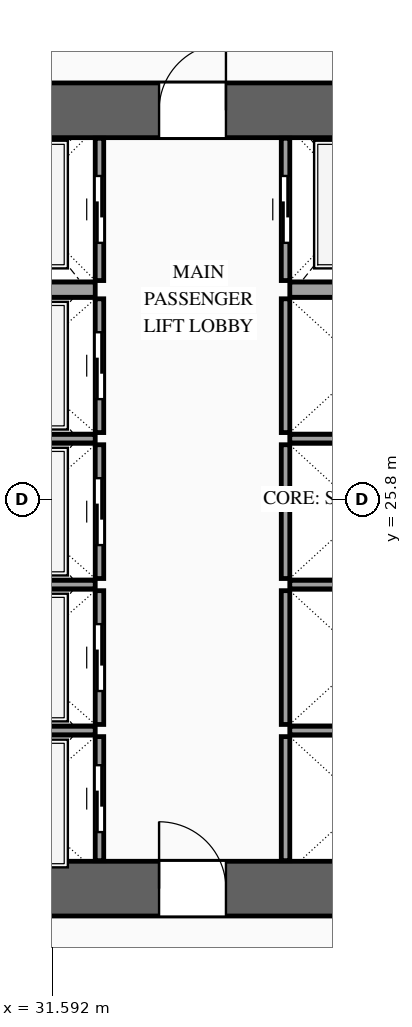
"""IFC4 building model, lengths in metres.
Left out: names, types, materials, properties, quantities, classifications, styles, units other than length and angle.
Written with IfcOpenShell. Run it as: python <this file> out.ifc"""

import sys

from ifc_helpers import new_model, si_unit, direction, frame, frame_2d, origin, place, context, subcontext, project, spatial, rectangle, extrude, source, transform, mapped, element, fill, save


model = new_model("IFC4")
c1 = context("Model", 3, precision=1e-05, world=origin(), true_north=direction((0.0, 1.0)))
c2 = subcontext(c1, "Body", "Model", "MODEL_VIEW")
j1 = project(units=[si_unit("LENGTHUNIT", "METRE"), si_unit("PLANEANGLEUNIT", "RADIAN")], contexts=[c1])
p1 = place(None, origin())
s1 = spatial("IfcSite", under=j1, at=p1, CompositionType="ELEMENT")
p2 = place(p1, origin())
s2 = spatial("IfcBuilding", under=s1, at=p2, CompositionType="ELEMENT")
p3 = place(p2, frame((0.0, 0.0, 25.8)))
s3 = spatial("IfcBuildingStorey", under=s2, at=p3, CompositionType="ELEMENT", Elevation=25.8)
p4 = place(p3, frame((23.35, 19.4, 0.0), z_axis=(0.0, 0.0, 1.0), x_axis=(1.0, 0.0, 0.0)))
e1 = element("IfcWall", 1, at=p4, inside=s3, PredefinedType="SHEAR", context=c2, shape_type="SweptSolid", body=[
    extrude(rectangle(XDim=27.3, YDim=0.9, at=frame_2d((13.65, 0.0))), origin(), (0.0, 0.0, 1.0), 4.8),
])
p5 = place(p4, frame((2.1, 0.0, 0.0)))
e2 = element("IfcOpeningElement", 2, at=p5, cuts=e1, PredefinedType="OPENING", context=c2, shape_type="SweptSolid", body=[
    extrude(rectangle(XDim=1.1, YDim=2.2, at=frame_2d((0.55, 1.1))), frame((0.0, 0.465, 0.0), z_axis=(0.0, -1.0, 0.0), x_axis=(1.0, 0.0, 0.0)), (0.0, 0.0, 1.0), 0.93),
])
p6 = place(p4, frame((10.0, 0.0, 0.0)))
e3 = element("IfcOpeningElement", 3, at=p6, cuts=e1, PredefinedType="OPENING", context=c2, shape_type="SweptSolid", body=[
    extrude(rectangle(XDim=1.1, YDim=2.2, at=frame_2d((0.55, 1.1))), frame((0.0, 0.465, 0.0), z_axis=(0.0, -1.0, 0.0), x_axis=(1.0, 0.0, 0.0)), (0.0, 0.0, 1.0), 0.93),
])
p7 = place(p4, frame((23.2, 0.0, 0.0)))
e4 = element("IfcOpeningElement", 4, at=p7, cuts=e1, PredefinedType="OPENING", context=c2, shape_type="SweptSolid", body=[
    extrude(rectangle(XDim=1.1, YDim=2.2, at=frame_2d((0.55, 1.1))), frame((0.0, 0.465, 0.0), z_axis=(0.0, -1.0, 0.0), x_axis=(1.0, 0.0, 0.0)), (0.0, 0.0, 1.0), 0.93),
])
p8 = place(p4, frame((19.82, 0.0, 0.0)))
e5 = element("IfcOpeningElement", 5, at=p8, cuts=e1, PredefinedType="OPENING", context=c2, shape_type="SweptSolid", body=[
    extrude(rectangle(XDim=0.9, YDim=2.15, at=frame_2d((0.45, 1.075))), frame((0.0, 0.465, 0.0), z_axis=(0.0, -1.0, 0.0), x_axis=(1.0, 0.0, 0.0)), (0.0, 0.0, 1.0), 0.93),
])
p9 = place(p4, frame((18.38, 0.0, 0.0)))
e6 = element("IfcOpeningElement", 6, at=p9, cuts=e1, PredefinedType="OPENING", context=c2, shape_type="SweptSolid", body=[
    extrude(rectangle(XDim=0.9, YDim=2.15, at=frame_2d((0.45, 1.075))), frame((0.0, 0.465, 0.0), z_axis=(0.0, -1.0, 0.0), x_axis=(1.0, 0.0, 0.0)), (0.0, 0.0, 1.0), 0.93),
])
p10 = place(p3, frame((23.35, 32.2, 0.0), z_axis=(0.0, 0.0, 1.0), x_axis=(1.0, 0.0, 0.0)))
e7 = element("IfcWall", 7, at=p10, inside=s3, PredefinedType="SHEAR", context=c2, shape_type="SweptSolid", body=[
    extrude(rectangle(XDim=27.3, YDim=0.9, at=frame_2d((13.65, 0.0))), origin(), (0.0, 0.0, 1.0), 4.8),
])
p11 = place(p10, frame((4.72, 0.0, 0.0)))
e8 = element("IfcOpeningElement", 8, at=p11, cuts=e7, PredefinedType="OPENING", context=c2, shape_type="SweptSolid", body=[
    extrude(rectangle(XDim=0.9, YDim=2.15, at=frame_2d((0.45, 1.075))), frame((0.0, 0.465, 0.0), z_axis=(0.0, -1.0, 0.0), x_axis=(1.0, 0.0, 0.0)), (0.0, 0.0, 1.0), 0.93),
])
p12 = place(p10, frame((10.0, 0.0, 0.0)))
e9 = element("IfcOpeningElement", 9, at=p12, cuts=e7, PredefinedType="OPENING", context=c2, shape_type="SweptSolid", body=[
    extrude(rectangle(XDim=1.1, YDim=2.2, at=frame_2d((0.55, 1.1))), frame((0.0, 0.465, 0.0), z_axis=(0.0, -1.0, 0.0), x_axis=(1.0, 0.0, 0.0)), (0.0, 0.0, 1.0), 0.93),
])
p13 = place(p10, frame((15.85, 0.0, 0.0)))
e10 = element("IfcOpeningElement", 10, at=p13, cuts=e7, PredefinedType="OPENING", context=c2, shape_type="SweptSolid", body=[
    extrude(rectangle(XDim=1.1, YDim=2.2, at=frame_2d((0.55, 1.1))), frame((0.0, 0.465, 0.0), z_axis=(0.0, -1.0, 0.0), x_axis=(1.0, 0.0, 0.0)), (0.0, 0.0, 1.0), 0.93),
])
p14 = place(p10, frame((18.38, 0.0, 0.0)))
e11 = element("IfcOpeningElement", 11, at=p14, cuts=e7, PredefinedType="OPENING", context=c2, shape_type="SweptSolid", body=[
    extrude(rectangle(XDim=0.9, YDim=2.15, at=frame_2d((0.45, 1.075))), frame((0.0, 0.465, 0.0), z_axis=(0.0, -1.0, 0.0), x_axis=(1.0, 0.0, 0.0)), (0.0, 0.0, 1.0), 0.93),
])
p15 = place(p10, frame((19.82, 0.0, 0.0)))
e12 = element("IfcOpeningElement", 12, at=p15, cuts=e7, PredefinedType="OPENING", context=c2, shape_type="SweptSolid", body=[
    extrude(rectangle(XDim=0.9, YDim=2.15, at=frame_2d((0.45, 1.075))), frame((0.0, 0.465, 0.0), z_axis=(0.0, -1.0, 0.0), x_axis=(1.0, 0.0, 0.0)), (0.0, 0.0, 1.0), 0.93),
])
p16 = place(p3, frame((32.37, 19.86, 0.0), z_axis=(0.0, 0.0, 1.0), x_axis=(0.0, 1.0, 0.0)))
e13 = element("IfcWall", 13, at=p16, inside=s3, PredefinedType="SOLIDWALL", context=c2, shape_type="SweptSolid", body=[
    extrude(rectangle(XDim=2.04, YDim=0.14, at=frame_2d((1.02, 0.0))), origin(), (0.0, 0.0, 1.0), 4.5),
])
p17 = place(p16, frame((0.47, 0.0, 0.0)))
e14 = element("IfcOpeningElement", 14, at=p17, cuts=e13, PredefinedType="OPENING", context=c2, shape_type="SweptSolid", body=[
    extrude(rectangle(XDim=1.1, YDim=2.2, at=frame_2d((0.55, 1.1))), frame((0.0, 0.085, 0.0), z_axis=(0.0, -1.0, 0.0), x_axis=(1.0, 0.0, 0.0)), (0.0, 0.0, 1.0), 0.17),
])
m1 = source(origin(), c2, "Body", "SweptSolid", [
    extrude(rectangle(XDim=2.5, YDim=0.14, at=frame_2d((1.25, 0.0))), origin(), (0.0, 0.0, 1.0), 4.5),
])
p18 = place(p3, frame((29.8, 22.0, 0.0), z_axis=(0.0, 0.0, 1.0), x_axis=(1.0, 0.0, 0.0)))
e15 = element("IfcWall", 15, at=p18, inside=s3, PredefinedType="SOLIDWALL", context=c2, shape_type="MappedRepresentation", body=[
    mapped(m1, transform((0.0, 0.0, 0.0), scale=1.0)),
])
p19 = place(p3, frame((32.37, 22.1, 0.0), z_axis=(0.0, 0.0, 1.0), x_axis=(0.0, 1.0, 0.0)))
e16 = element("IfcWall", 16, at=p19, inside=s3, PredefinedType="SOLIDWALL", context=c2, shape_type="SweptSolid", body=[
    extrude(rectangle(XDim=2.2, YDim=0.14, at=frame_2d((1.1, 0.0))), origin(), (0.0, 0.0, 1.0), 4.5),
])
p20 = place(p19, frame((0.55, 0.0, 0.0)))
e17 = element("IfcOpeningElement", 17, at=p20, cuts=e16, PredefinedType="OPENING", context=c2, shape_type="SweptSolid", body=[
    extrude(rectangle(XDim=1.1, YDim=2.2, at=frame_2d((0.55, 1.1))), frame((0.0, 0.085, 0.0), z_axis=(0.0, -1.0, 0.0), x_axis=(1.0, 0.0, 0.0)), (0.0, 0.0, 1.0), 0.17),
])
p21 = place(p3, frame((29.8, 24.4, 0.0), z_axis=(0.0, 0.0, 1.0), x_axis=(1.0, 0.0, 0.0)))
e18 = element("IfcWall", 18, at=p21, inside=s3, PredefinedType="SOLIDWALL", context=c2, shape_type="MappedRepresentation", body=[
    mapped(m1, transform((0.0, 0.0, 0.0), scale=1.0)),
])
p22 = place(p3, frame((32.37, 24.5, 0.0), z_axis=(0.0, 0.0, 1.0), x_axis=(0.0, 1.0, 0.0)))
e19 = element("IfcWall", 19, at=p22, inside=s3, PredefinedType="SOLIDWALL", context=c2, shape_type="SweptSolid", body=[
    extrude(rectangle(XDim=2.2, YDim=0.14, at=frame_2d((1.1, 0.0))), origin(), (0.0, 0.0, 1.0), 4.5),
])
p23 = place(p22, frame((0.55, 0.0, 0.0)))
e20 = element("IfcOpeningElement", 20, at=p23, cuts=e19, PredefinedType="OPENING", context=c2, shape_type="SweptSolid", body=[
    extrude(rectangle(XDim=1.1, YDim=2.2, at=frame_2d((0.55, 1.1))), frame((0.0, 0.085, 0.0), z_axis=(0.0, -1.0, 0.0), x_axis=(1.0, 0.0, 0.0)), (0.0, 0.0, 1.0), 0.17),
])
p24 = place(p3, frame((29.8, 26.8, 0.0), z_axis=(0.0, 0.0, 1.0), x_axis=(1.0, 0.0, 0.0)))
e21 = element("IfcWall", 21, at=p24, inside=s3, PredefinedType="SOLIDWALL", context=c2, shape_type="MappedRepresentation", body=[
    mapped(m1, transform((0.0, 0.0, 0.0), scale=1.0)),
])
p25 = place(p3, frame((32.37, 26.9, 0.0), z_axis=(0.0, 0.0, 1.0), x_axis=(0.0, 1.0, 0.0)))
e22 = element("IfcWall", 22, at=p25, inside=s3, PredefinedType="SOLIDWALL", context=c2, shape_type="SweptSolid", body=[
    extrude(rectangle(XDim=2.2, YDim=0.14, at=frame_2d((1.1, 0.0))), origin(), (0.0, 0.0, 1.0), 4.5),
])
p26 = place(p25, frame((0.55, 0.0, 0.0)))
e23 = element("IfcOpeningElement", 23, at=p26, cuts=e22, PredefinedType="OPENING", context=c2, shape_type="SweptSolid", body=[
    extrude(rectangle(XDim=1.1, YDim=2.2, at=frame_2d((0.55, 1.1))), frame((0.0, 0.085, 0.0), z_axis=(0.0, -1.0, 0.0), x_axis=(1.0, 0.0, 0.0)), (0.0, 0.0, 1.0), 0.17),
])
p27 = place(p3, frame((32.37, 29.4, 0.0), z_axis=(0.0, 0.0, 1.0), x_axis=(0.0, 1.0, 0.0)))
e24 = element("IfcWall", 24, at=p27, inside=s3, PredefinedType="SOLIDWALL", context=c2, shape_type="SweptSolid", body=[
    extrude(rectangle(XDim=2.34, YDim=0.14, at=frame_2d((1.17, 0.0))), origin(), (0.0, 0.0, 1.0), 4.5),
])
p28 = place(p27, frame((0.62, 0.0, 0.0)))
e25 = element("IfcOpeningElement", 25, at=p28, cuts=e24, PredefinedType="OPENING", context=c2, shape_type="SweptSolid", body=[
    extrude(rectangle(XDim=1.1, YDim=2.2, at=frame_2d((0.55, 1.1))), frame((0.0, 0.085, 0.0), z_axis=(0.0, -1.0, 0.0), x_axis=(1.0, 0.0, 0.0)), (0.0, 0.0, 1.0), 0.17),
])
m2 = source(origin(), c2, "Body", "SweptSolid", [
    extrude(rectangle(XDim=2.5, YDim=0.25, at=frame_2d((1.25, 0.0))), origin(), (0.0, 0.0, 1.0), 4.5),
])
p29 = place(p3, frame((29.8, 29.25, 0.0), z_axis=(0.0, 0.0, 1.0), x_axis=(1.0, 0.0, 0.0)))
e26 = element("IfcWall", 26, at=p29, inside=s3, PredefinedType="SOLIDWALL", context=c2, shape_type="MappedRepresentation", body=[
    mapped(m2, transform((0.0, 0.0, 0.0), scale=1.0)),
])
m3 = source(origin(), c2, "Body", "SweptSolid", [
    extrude(rectangle(XDim=2.04, YDim=0.14, at=frame_2d((1.02, 0.0))), origin(), (0.0, 0.0, 1.0), 4.5),
])
p30 = place(p3, frame((35.43, 19.86, 0.0), z_axis=(0.0, 0.0, 1.0), x_axis=(0.0, 1.0, 0.0)))
e27 = element("IfcWall", 27, at=p30, inside=s3, PredefinedType="SOLIDWALL", context=c2, shape_type="MappedRepresentation", body=[
    mapped(m3, transform((0.0, 0.0, 0.0), scale=1.0)),
])
m4 = source(origin(), c2, "Body", "SweptSolid", [
    extrude(rectangle(XDim=2.4, YDim=0.14, at=frame_2d((1.2, 0.0))), origin(), (0.0, 0.0, 1.0), 4.5),
])
p31 = place(p3, frame((35.5, 22.0, 0.0), z_axis=(0.0, 0.0, 1.0), x_axis=(1.0, 0.0, 0.0)))
e28 = element("IfcWall", 28, at=p31, inside=s3, PredefinedType="SOLIDWALL", context=c2, shape_type="MappedRepresentation", body=[
    mapped(m4, transform((0.0, 0.0, 0.0), scale=1.0)),
])
m5 = source(origin(), c2, "Body", "SweptSolid", [
    extrude(rectangle(XDim=2.2, YDim=0.14, at=frame_2d((1.1, 0.0))), origin(), (0.0, 0.0, 1.0), 4.5),
])
p32 = place(p3, frame((35.43, 22.1, 0.0), z_axis=(0.0, 0.0, 1.0), x_axis=(0.0, 1.0, 0.0)))
e29 = element("IfcWall", 29, at=p32, inside=s3, PredefinedType="SOLIDWALL", context=c2, shape_type="MappedRepresentation", body=[
    mapped(m5, transform((0.0, 0.0, 0.0), scale=1.0)),
])
p33 = place(p3, frame((35.5, 24.4, 0.0), z_axis=(0.0, 0.0, 1.0), x_axis=(1.0, 0.0, 0.0)))
e30 = element("IfcWall", 30, at=p33, inside=s3, PredefinedType="SOLIDWALL", context=c2, shape_type="MappedRepresentation", body=[
    mapped(m4, transform((0.0, 0.0, 0.0), scale=1.0)),
])
p34 = place(p3, frame((35.43, 24.5, 0.0), z_axis=(0.0, 0.0, 1.0), x_axis=(0.0, 1.0, 0.0)))
e31 = element("IfcWall", 31, at=p34, inside=s3, PredefinedType="SOLIDWALL", context=c2, shape_type="MappedRepresentation", body=[
    mapped(m5, transform((0.0, 0.0, 0.0), scale=1.0)),
])
p35 = place(p3, frame((35.5, 26.8, 0.0), z_axis=(0.0, 0.0, 1.0), x_axis=(1.0, 0.0, 0.0)))
e32 = element("IfcWall", 32, at=p35, inside=s3, PredefinedType="SOLIDWALL", context=c2, shape_type="MappedRepresentation", body=[
    mapped(m4, transform((0.0, 0.0, 0.0), scale=1.0)),
])
m6 = source(origin(), c2, "Body", "SweptSolid", [
    extrude(rectangle(XDim=2.2, YDim=0.14, at=frame_2d((1.1, 0.0))), origin(), (0.0, 0.0, 1.0), 4.5),
])
p36 = place(p3, frame((35.43, 26.9, 0.0), z_axis=(0.0, 0.0, 1.0), x_axis=(0.0, 1.0, 0.0)))
e33 = element("IfcWall", 33, at=p36, inside=s3, PredefinedType="SOLIDWALL", context=c2, shape_type="MappedRepresentation", body=[
    mapped(m6, transform((0.0, 0.0, 0.0), scale=1.0)),
])
p37 = place(p3, frame((35.43, 29.4, 0.0), z_axis=(0.0, 0.0, 1.0), x_axis=(0.0, 1.0, 0.0)))
e34 = element("IfcWall", 34, at=p37, inside=s3, PredefinedType="SOLIDWALL", context=c2, shape_type="SweptSolid", body=[
    extrude(rectangle(XDim=2.34, YDim=0.14, at=frame_2d((1.17, 0.0))), origin(), (0.0, 0.0, 1.0), 4.5),
])
p38 = place(p37, frame((0.62, 0.0, 0.0)))
e35 = element("IfcOpeningElement", 35, at=p38, cuts=e34, PredefinedType="OPENING", context=c2, shape_type="SweptSolid", body=[
    extrude(rectangle(XDim=1.1, YDim=2.2, at=frame_2d((0.55, 1.1))), frame((0.0, 0.085, 0.0), z_axis=(0.0, -1.0, 0.0), x_axis=(1.0, 0.0, 0.0)), (0.0, 0.0, 1.0), 0.17),
])
m7 = source(origin(), c2, "Body", "SweptSolid", [
    extrude(rectangle(XDim=2.4, YDim=0.25, at=frame_2d((1.2, 0.0))), origin(), (0.0, 0.0, 1.0), 4.5),
])
p39 = place(p3, frame((35.5, 29.25, 0.0), z_axis=(0.0, 0.0, 1.0), x_axis=(1.0, 0.0, 0.0)))
e36 = element("IfcWall", 36, at=p39, inside=s3, PredefinedType="SOLIDWALL", context=c2, shape_type="MappedRepresentation", body=[
    mapped(m7, transform((0.0, 0.0, 0.0), scale=1.0)),
])
m8 = source(origin(), c2, "Body", "SweptSolid", [
    extrude(rectangle(XDim=1.1, YDim=2.2, at=frame_2d((0.55, 1.1))), frame((0.0, 0.025, 0.0), z_axis=(0.0, -1.0, 0.0), x_axis=(1.0, 0.0, 0.0)), (0.0, 0.0, 1.0), 0.05),
])
p40 = place(p17, origin())
e37 = element("IfcDoor", 37, at=p40, inside=s3, OperationType="SLIDING_TO_LEFT", PredefinedType="DOOR", context=c2, shape_type="MappedRepresentation", body=[
    mapped(m8, transform((0.0, 0.0, 0.0), scale=1.0)),
])
fill(e14, e37)
p41 = place(p20, origin())
e38 = element("IfcDoor", 38, at=p41, inside=s3, OperationType="SLIDING_TO_RIGHT", PredefinedType="DOOR", context=c2, shape_type="MappedRepresentation", body=[
    mapped(m8, transform((0.0, 0.0, 0.0), scale=1.0)),
])
fill(e17, e38)
p42 = place(p23, origin())
e39 = element("IfcDoor", 39, at=p42, inside=s3, OperationType="SLIDING_TO_LEFT", PredefinedType="DOOR", context=c2, shape_type="MappedRepresentation", body=[
    mapped(m8, transform((0.0, 0.0, 0.0), scale=1.0)),
])
fill(e20, e39)
p43 = place(p26, origin())
e40 = element("IfcDoor", 40, at=p43, inside=s3, OperationType="SLIDING_TO_RIGHT", PredefinedType="DOOR", context=c2, shape_type="MappedRepresentation", body=[
    mapped(m8, transform((0.0, 0.0, 0.0), scale=1.0)),
])
fill(e23, e40)
p44 = place(p28, origin())
e41 = element("IfcDoor", 41, at=p44, inside=s3, OperationType="SLIDING_TO_LEFT", PredefinedType="DOOR", context=c2, shape_type="MappedRepresentation", body=[
    mapped(m8, transform((0.0, 0.0, 0.0), scale=1.0)),
])
fill(e25, e41)
p45 = place(p38, origin())
e42 = element("IfcDoor", 42, at=p45, inside=s3, OperationType="SLIDING_TO_RIGHT", PredefinedType="DOOR", context=c2, shape_type="MappedRepresentation", body=[
    mapped(m8, transform((0.0, 0.0, 0.0), scale=1.0)),
])
fill(e35, e42)
m9 = source(origin(), c2, "Body", "SweptSolid", [
    extrude(rectangle(XDim=1.1, YDim=2.2, at=frame_2d((0.55, 1.1))), frame((0.0, 0.025, 0.0), z_axis=(0.0, -1.0, 0.0), x_axis=(1.0, 0.0, 0.0)), (0.0, 0.0, 1.0), 0.05),
])
p46 = place(p6, origin())
e43 = element("IfcDoor", 43, at=p46, inside=s3, OperationType="SINGLE_SWING_LEFT", PredefinedType="DOOR", context=c2, shape_type="MappedRepresentation", body=[
    mapped(m9, transform((0.0, 0.0, 0.0), scale=1.0)),
])
fill(e3, e43)
p47 = place(p12, origin())
e44 = element("IfcDoor", 44, at=p47, inside=s3, OperationType="SINGLE_SWING_RIGHT", PredefinedType="DOOR", context=c2, shape_type="MappedRepresentation", body=[
    mapped(m9, transform((0.0, 0.0, 0.0), scale=1.0)),
])
fill(e9, e44)
save(model, sys.argv[1])
